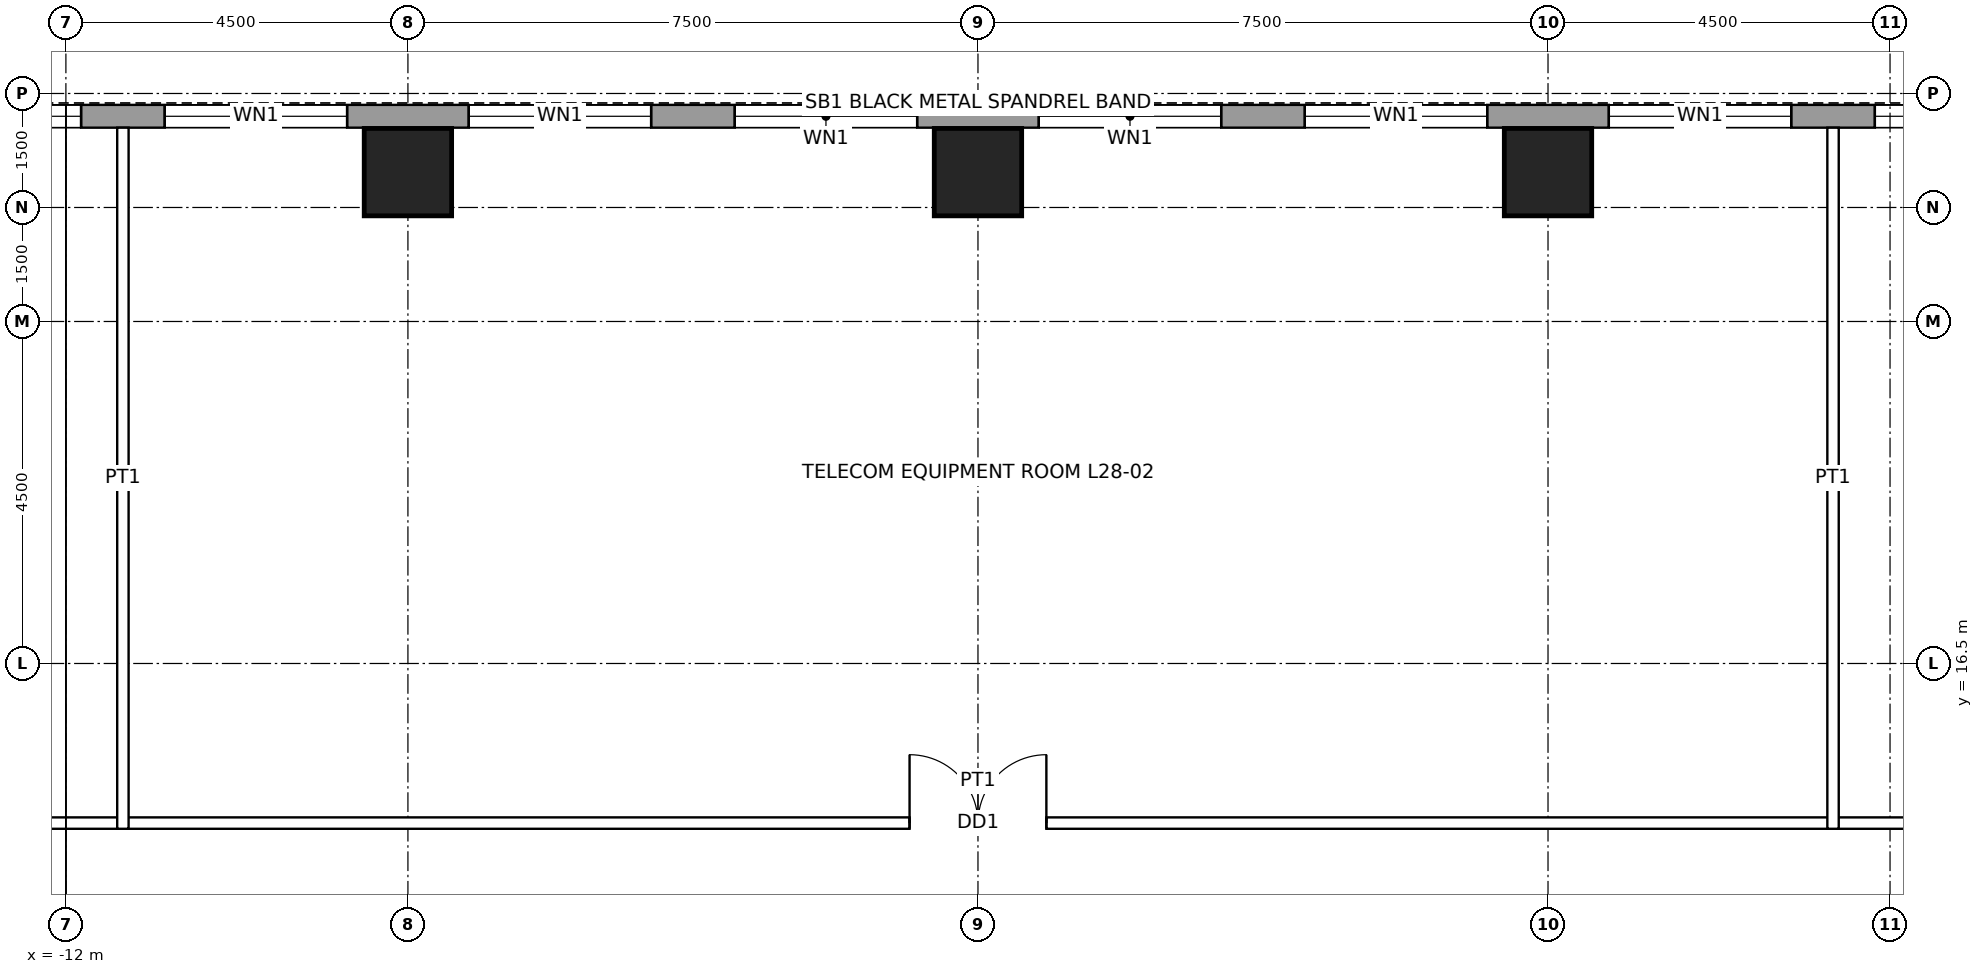
"""IFC4 building model, lengths in metres.
Left out: names, types, materials, properties, quantities, classifications, styles, units other than length and angle.
Written with IfcOpenShell. Run it as: python <this file> out.ifc"""

import sys

from ifc_helpers import new_model, si_unit, direction, frame, frame_2d, origin, origin_2d, place, context, subcontext, project, spatial, rectangle, hollow_rectangle, extrude, element, fill, save


model = new_model("IFC4")
c1 = context("Model", 3, precision=1e-05, world=origin(), true_north=direction((0.0, 1.0)))
c2 = subcontext(c1, "Body", "Model", "MODEL_VIEW")
j1 = project(units=[si_unit("LENGTHUNIT", "METRE"), si_unit("PLANEANGLEUNIT", "RADIAN")], contexts=[c1])
p1 = place(None, origin())
s1 = spatial("IfcSite", under=j1, at=p1, CompositionType="ELEMENT")
p2 = place(p1, origin())
s2 = spatial("IfcBuilding", under=s1, at=p2, CompositionType="ELEMENT")
p3 = place(p2, frame((0.0, 0.0, 140.4)))
s3 = spatial("IfcBuildingStorey", under=s2, at=p3, CompositionType="ELEMENT", Elevation=140.4)
for number, where, z_axis, x_axis in (
    (1, (-7.5, 22.965, 0.0), (0.0, 0.0, 1.0), (1.0, 0.0, 0.0)),
    (2, (0.0, 22.965, 0.0), (0.0, 0.0, 1.0), (1.0, 0.0, 0.0)),
    (3, (7.5, 22.965, 0.0), (0.0, 0.0, 1.0), (1.0, 0.0, 0.0)),
):
    element("IfcColumn", number, at=place(p3, frame(where, z_axis=z_axis, x_axis=x_axis)), inside=s3, PredefinedType="COLUMN", context=c2, shape_type="SweptSolid", body=[
        extrude(hollow_rectangle(XDim=1.15, YDim=1.15, WallThickness=0.075, at=origin_2d()), origin(), (0.0, 0.0, 1.0), 4.5),
    ])
p4 = place(p3, frame((-16.2, 23.7, 0.0), z_axis=(0.0, 0.0, 1.0), x_axis=(1.0, 0.0, 0.0)))
e4 = element("IfcWall", 4, at=p4, inside=s3, PredefinedType="SOLIDWALL", context=c2, shape_type="SweptSolid", body=[
    extrude(rectangle(XDim=32.4, YDim=0.3, at=frame_2d((16.2, 0.0))), origin(), (0.0, 0.0, 1.0), 4.3),
])
p5 = place(p4, frame((2.0, 0.0, 1.0)))
e5 = element("IfcOpeningElement", 5, at=p5, cuts=e4, PredefinedType="OPENING", context=c2, shape_type="SweptSolid", body=[
    extrude(rectangle(XDim=2.4, YDim=1.2, at=frame_2d((1.2, 0.6))), frame((0.0, 0.16, 0.0), z_axis=(0.0, -1.0, 0.0), x_axis=(1.0, 0.0, 0.0)), (0.0, 0.0, 1.0), 0.32),
])
p6 = place(p4, frame((5.5, 0.0, 1.0)))
e6 = element("IfcOpeningElement", 6, at=p6, cuts=e4, PredefinedType="OPENING", context=c2, shape_type="SweptSolid", body=[
    extrude(rectangle(XDim=2.4, YDim=1.2, at=frame_2d((1.2, 0.6))), frame((0.0, 0.16, 0.0), z_axis=(0.0, -1.0, 0.0), x_axis=(1.0, 0.0, 0.0)), (0.0, 0.0, 1.0), 0.32),
])
p7 = place(p4, frame((9.5, 0.0, 1.0)))
e7 = element("IfcOpeningElement", 7, at=p7, cuts=e4, PredefinedType="OPENING", context=c2, shape_type="SweptSolid", body=[
    extrude(rectangle(XDim=2.4, YDim=1.2, at=frame_2d((1.2, 0.6))), frame((0.0, 0.16, 0.0), z_axis=(0.0, -1.0, 0.0), x_axis=(1.0, 0.0, 0.0)), (0.0, 0.0, 1.0), 0.32),
])
p8 = place(p4, frame((13.0, 0.0, 1.0)))
e8 = element("IfcOpeningElement", 8, at=p8, cuts=e4, PredefinedType="OPENING", context=c2, shape_type="SweptSolid", body=[
    extrude(rectangle(XDim=2.4, YDim=1.2, at=frame_2d((1.2, 0.6))), frame((0.0, 0.16, 0.0), z_axis=(0.0, -1.0, 0.0), x_axis=(1.0, 0.0, 0.0)), (0.0, 0.0, 1.0), 0.32),
])
p9 = place(p4, frame((17.0, 0.0, 1.0)))
e9 = element("IfcOpeningElement", 9, at=p9, cuts=e4, PredefinedType="OPENING", context=c2, shape_type="SweptSolid", body=[
    extrude(rectangle(XDim=2.4, YDim=1.2, at=frame_2d((1.2, 0.6))), frame((0.0, 0.16, 0.0), z_axis=(0.0, -1.0, 0.0), x_axis=(1.0, 0.0, 0.0)), (0.0, 0.0, 1.0), 0.32),
])
p10 = place(p4, frame((20.5, 0.0, 1.0)))
e10 = element("IfcOpeningElement", 10, at=p10, cuts=e4, PredefinedType="OPENING", context=c2, shape_type="SweptSolid", body=[
    extrude(rectangle(XDim=2.4, YDim=1.2, at=frame_2d((1.2, 0.6))), frame((0.0, 0.16, 0.0), z_axis=(0.0, -1.0, 0.0), x_axis=(1.0, 0.0, 0.0)), (0.0, 0.0, 1.0), 0.32),
])
p11 = place(p4, frame((24.5, 0.0, 1.0)))
e11 = element("IfcOpeningElement", 11, at=p11, cuts=e4, PredefinedType="OPENING", context=c2, shape_type="SweptSolid", body=[
    extrude(rectangle(XDim=2.4, YDim=1.2, at=frame_2d((1.2, 0.6))), frame((0.0, 0.16, 0.0), z_axis=(0.0, -1.0, 0.0), x_axis=(1.0, 0.0, 0.0)), (0.0, 0.0, 1.0), 0.32),
])
p12 = place(p4, frame((28.0, 0.0, 1.0)))
e12 = element("IfcOpeningElement", 12, at=p12, cuts=e4, PredefinedType="OPENING", context=c2, shape_type="SweptSolid", body=[
    extrude(rectangle(XDim=2.4, YDim=1.2, at=frame_2d((1.2, 0.6))), frame((0.0, 0.16, 0.0), z_axis=(0.0, -1.0, 0.0), x_axis=(1.0, 0.0, 0.0)), (0.0, 0.0, 1.0), 0.32),
])
p13 = place(p3, frame((-14.475, 14.4, 0.0), z_axis=(0.0, 0.0, 1.0), x_axis=(1.0, 0.0, 0.0)))
e13 = element("IfcWall", 13, at=p13, inside=s3, PredefinedType="PARTITIONING", context=c2, shape_type="SweptSolid", body=[
    extrude(rectangle(XDim=28.95, YDim=0.15, at=frame_2d((14.475, 0.0))), origin(), (0.0, 0.0, 1.0), 4.3),
])
p14 = place(p13, frame((13.575, 0.0, 0.0)))
e14 = element("IfcOpeningElement", 14, at=p14, cuts=e13, PredefinedType="OPENING", context=c2, shape_type="SweptSolid", body=[
    extrude(rectangle(XDim=1.8, YDim=2.4, at=frame_2d((0.9, 1.2))), frame((0.0, 0.085, 0.0), z_axis=(0.0, -1.0, 0.0), x_axis=(1.0, 0.0, 0.0)), (0.0, 0.0, 1.0), 0.17),
])
p15 = place(p13, frame((26.8, 0.0, 0.0)))
e15 = element("IfcOpeningElement", 15, at=p15, cuts=e13, PredefinedType="OPENING", context=c2, shape_type="SweptSolid", body=[
    extrude(rectangle(XDim=1.0, YDim=2.1, at=frame_2d((0.5, 1.05))), frame((0.0, 0.085, 0.0), z_axis=(0.0, -1.0, 0.0), x_axis=(1.0, 0.0, 0.0)), (0.0, 0.0, 1.0), 0.17),
])
p16 = place(p13, frame((1.15, 0.0, 0.0)))
e16 = element("IfcOpeningElement", 16, at=p16, cuts=e13, PredefinedType="OPENING", context=c2, shape_type="SweptSolid", body=[
    extrude(rectangle(XDim=1.0, YDim=2.1, at=frame_2d((0.5, 1.05))), frame((0.0, 0.085, 0.0), z_axis=(0.0, -1.0, 0.0), x_axis=(1.0, 0.0, 0.0)), (0.0, 0.0, 1.0), 0.17),
])
for number, where, z_axis, x_axis in (
    (17, (-11.25, 14.325, 0.0), (0.0, 0.0, 1.0), (0.0, 1.0, 0.0)),
    (18, (11.25, 14.325, 0.0), (0.0, 0.0, 1.0), (0.0, 1.0, 0.0)),
):
    element("IfcWall", number, at=place(p3, frame(where, z_axis=z_axis, x_axis=x_axis)), inside=s3, PredefinedType="PARTITIONING", context=c2, shape_type="SweptSolid", body=[
        extrude(rectangle(XDim=9.225, YDim=0.15, at=frame_2d((4.613, 0.0))), origin(), (0.0, 0.0, 1.0), 3.431),
    ])
p17 = place(p5, origin())
e19 = element("IfcWindow", 19, at=p17, inside=s3, PartitioningType="SINGLE_PANEL", PredefinedType="WINDOW", context=c2, shape_type="SweptSolid", body=[
    extrude(rectangle(XDim=2.4, YDim=1.2, at=frame_2d((1.2, 0.6))), frame((0.0, 0.03, 0.0), z_axis=(0.0, -1.0, 0.0), x_axis=(1.0, 0.0, 0.0)), (0.0, 0.0, 1.0), 0.06),
])
fill(e5, e19)
p18 = place(p6, origin())
e20 = element("IfcWindow", 20, at=p18, inside=s3, PartitioningType="SINGLE_PANEL", PredefinedType="WINDOW", context=c2, shape_type="SweptSolid", body=[
    extrude(rectangle(XDim=2.4, YDim=1.2, at=frame_2d((1.2, 0.6))), frame((0.0, 0.03, 0.0), z_axis=(0.0, -1.0, 0.0), x_axis=(1.0, 0.0, 0.0)), (0.0, 0.0, 1.0), 0.06),
])
fill(e6, e20)
p19 = place(p7, origin())
e21 = element("IfcWindow", 21, at=p19, inside=s3, PartitioningType="SINGLE_PANEL", PredefinedType="WINDOW", context=c2, shape_type="SweptSolid", body=[
    extrude(rectangle(XDim=2.4, YDim=1.2, at=frame_2d((1.2, 0.6))), frame((0.0, 0.03, 0.0), z_axis=(0.0, -1.0, 0.0), x_axis=(1.0, 0.0, 0.0)), (0.0, 0.0, 1.0), 0.06),
])
fill(e7, e21)
p20 = place(p8, origin())
e22 = element("IfcWindow", 22, at=p20, inside=s3, PartitioningType="SINGLE_PANEL", PredefinedType="WINDOW", context=c2, shape_type="SweptSolid", body=[
    extrude(rectangle(XDim=2.4, YDim=1.2, at=frame_2d((1.2, 0.6))), frame((0.0, 0.03, 0.0), z_axis=(0.0, -1.0, 0.0), x_axis=(1.0, 0.0, 0.0)), (0.0, 0.0, 1.0), 0.06),
])
fill(e8, e22)
p21 = place(p9, origin())
e23 = element("IfcWindow", 23, at=p21, inside=s3, PartitioningType="SINGLE_PANEL", PredefinedType="WINDOW", context=c2, shape_type="SweptSolid", body=[
    extrude(rectangle(XDim=2.4, YDim=1.2, at=frame_2d((1.2, 0.6))), frame((0.0, 0.03, 0.0), z_axis=(0.0, -1.0, 0.0), x_axis=(1.0, 0.0, 0.0)), (0.0, 0.0, 1.0), 0.06),
])
fill(e9, e23)
p22 = place(p10, origin())
e24 = element("IfcWindow", 24, at=p22, inside=s3, PartitioningType="SINGLE_PANEL", PredefinedType="WINDOW", context=c2, shape_type="SweptSolid", body=[
    extrude(rectangle(XDim=2.4, YDim=1.2, at=frame_2d((1.2, 0.6))), frame((0.0, 0.03, 0.0), z_axis=(0.0, -1.0, 0.0), x_axis=(1.0, 0.0, 0.0)), (0.0, 0.0, 1.0), 0.06),
])
fill(e10, e24)
p23 = place(p11, origin())
e25 = element("IfcWindow", 25, at=p23, inside=s3, PartitioningType="SINGLE_PANEL", PredefinedType="WINDOW", context=c2, shape_type="SweptSolid", body=[
    extrude(rectangle(XDim=2.4, YDim=1.2, at=frame_2d((1.2, 0.6))), frame((0.0, 0.03, 0.0), z_axis=(0.0, -1.0, 0.0), x_axis=(1.0, 0.0, 0.0)), (0.0, 0.0, 1.0), 0.06),
])
fill(e11, e25)
p24 = place(p12, origin())
e26 = element("IfcWindow", 26, at=p24, inside=s3, PartitioningType="SINGLE_PANEL", PredefinedType="WINDOW", context=c2, shape_type="SweptSolid", body=[
    extrude(rectangle(XDim=2.4, YDim=1.2, at=frame_2d((1.2, 0.6))), frame((0.0, 0.03, 0.0), z_axis=(0.0, -1.0, 0.0), x_axis=(1.0, 0.0, 0.0)), (0.0, 0.0, 1.0), 0.06),
])
fill(e12, e26)
p25 = place(p14, origin())
e27 = element("IfcDoor", 27, at=p25, inside=s3, OperationType="DOUBLE_DOOR_SINGLE_SWING", PredefinedType="DOOR", context=c2, shape_type="SweptSolid", body=[
    extrude(rectangle(XDim=1.8, YDim=2.4, at=frame_2d((0.9, 1.2))), frame((0.0, 0.025, 0.0), z_axis=(0.0, -1.0, 0.0), x_axis=(1.0, 0.0, 0.0)), (0.0, 0.0, 1.0), 0.05),
])
fill(e14, e27)
save(model, sys.argv[1])
